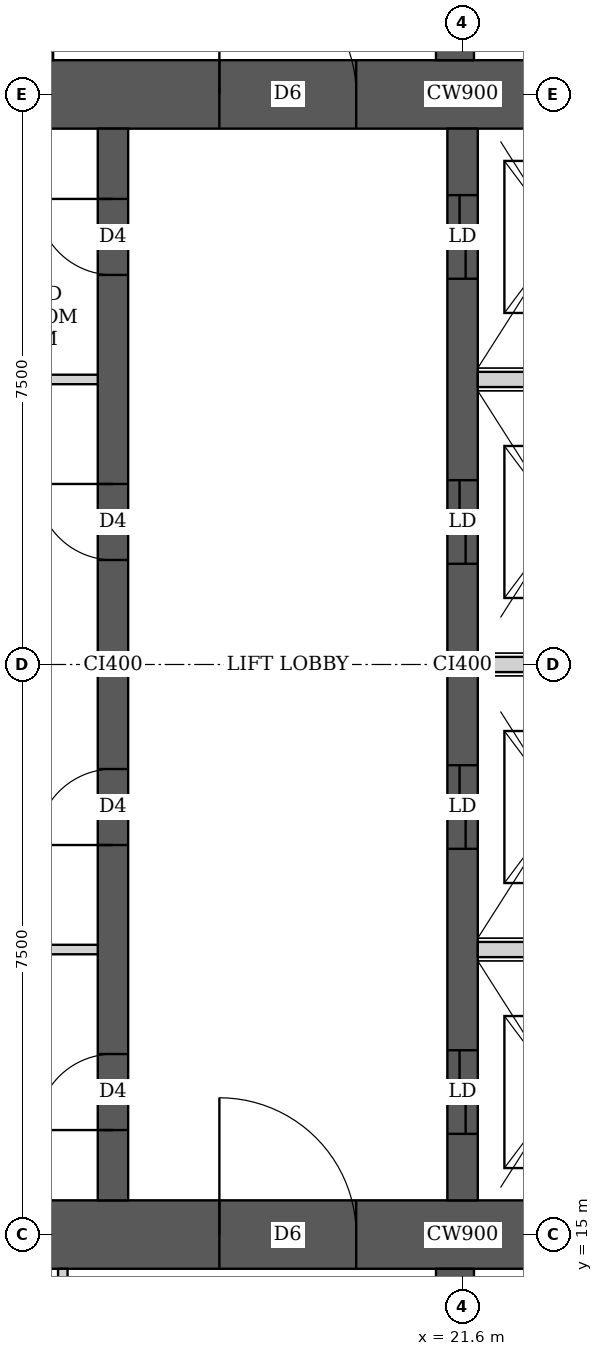
"""IFC4 building model, lengths in metres.
Left out: names, types, materials, properties, quantities, classifications, styles, units other than length and angle.
Written with IfcOpenShell. Run it as: python <this file> out.ifc"""

import sys

from ifc_helpers import new_model, si_unit, direction, frame, frame_2d, origin, place, context, subcontext, project, spatial, rectangle, extrude, element, fill, save


model = new_model("IFC4")
c1 = context("Model", 3, precision=1e-05, world=origin(), true_north=direction((0.0, 1.0)))
c2 = subcontext(c1, "Body", "Model", "MODEL_VIEW")
j1 = project(units=[si_unit("LENGTHUNIT", "METRE"), si_unit("PLANEANGLEUNIT", "RADIAN")], contexts=[c1])
p1 = place(None, origin())
s1 = spatial("IfcSite", under=j1, at=p1, CompositionType="ELEMENT")
p2 = place(p1, origin())
s2 = spatial("IfcBuilding", under=s1, at=p2, CompositionType="ELEMENT")
p3 = place(p2, frame((0.0, 0.0, 212.45)))
s3 = spatial("IfcBuildingStorey", under=s2, at=p3, CompositionType="ELEMENT", Elevation=212.45)
p4 = place(p3, frame((13.95, 15.0, 0.0), z_axis=(0.0, 0.0, 1.0), x_axis=(1.0, 0.0, 0.0)))
e1 = element("IfcWall", 1, at=p4, inside=s3, PredefinedType="SHEAR", context=c2, shape_type="SweptSolid", body=[
    extrude(rectangle(XDim=15.3, YDim=0.9, at=frame_2d((7.65, 0.0))), origin(), (0.0, 0.0, 1.0), 3.75),
])
p5 = place(p4, frame((4.45, 0.0, 0.0)))
e2 = element("IfcOpeningElement", 2, at=p5, cuts=e1, PredefinedType="OPENING", context=c2, shape_type="SweptSolid", body=[
    extrude(rectangle(XDim=1.8, YDim=2.1, at=frame_2d((0.9, 1.05))), frame((0.0, 0.46, 0.0), z_axis=(0.0, -1.0, 0.0), x_axis=(1.0, 0.0, 0.0)), (0.0, 0.0, 1.0), 0.92),
])
p6 = place(p4, frame((10.7, 0.0, 0.0)))
e3 = element("IfcOpeningElement", 3, at=p6, cuts=e1, PredefinedType="OPENING", context=c2, shape_type="SweptSolid", body=[
    extrude(rectangle(XDim=1.1, YDim=2.1, at=frame_2d((0.55, 1.05))), frame((0.0, 0.46, 0.0), z_axis=(0.0, -1.0, 0.0), x_axis=(1.0, 0.0, 0.0)), (0.0, 0.0, 1.0), 0.92),
])
p7 = place(p3, frame((13.95, 30.0, 0.0), z_axis=(0.0, 0.0, 1.0), x_axis=(1.0, 0.0, 0.0)))
e4 = element("IfcWall", 4, at=p7, inside=s3, PredefinedType="SHEAR", context=c2, shape_type="SweptSolid", body=[
    extrude(rectangle(XDim=15.3, YDim=0.9, at=frame_2d((7.65, 0.0))), origin(), (0.0, 0.0, 1.0), 3.75),
])
p8 = place(p7, frame((4.45, 0.0, 0.0)))
e5 = element("IfcOpeningElement", 5, at=p8, cuts=e4, PredefinedType="OPENING", context=c2, shape_type="SweptSolid", body=[
    extrude(rectangle(XDim=1.8, YDim=2.1, at=frame_2d((0.9, 1.05))), frame((0.0, 0.46, 0.0), z_axis=(0.0, -1.0, 0.0), x_axis=(1.0, 0.0, 0.0)), (0.0, 0.0, 1.0), 0.92),
])
p9 = place(p7, frame((10.7, 0.0, 0.0)))
e6 = element("IfcOpeningElement", 6, at=p9, cuts=e4, PredefinedType="OPENING", context=c2, shape_type="SweptSolid", body=[
    extrude(rectangle(XDim=1.1, YDim=2.1, at=frame_2d((0.55, 1.05))), frame((0.0, 0.46, 0.0), z_axis=(0.0, -1.0, 0.0), x_axis=(1.0, 0.0, 0.0)), (0.0, 0.0, 1.0), 0.92),
])
p10 = place(p3, frame((17.0, 15.45, 0.0), z_axis=(0.0, 0.0, 1.0), x_axis=(0.0, 1.0, 0.0)))
e7 = element("IfcWall", 7, at=p10, inside=s3, PredefinedType="SHEAR", context=c2, shape_type="SweptSolid", body=[
    extrude(rectangle(XDim=14.1, YDim=0.4, at=frame_2d((7.05, 0.0))), origin(), (0.0, 0.0, 1.0), 3.75),
])
p11 = place(p10, frame((0.925, 0.0, 0.0)))
e8 = element("IfcOpeningElement", 8, at=p11, cuts=e7, PredefinedType="OPENING", context=c2, shape_type="SweptSolid", body=[
    extrude(rectangle(XDim=1.0, YDim=2.1, at=frame_2d((0.5, 1.05))), frame((0.0, 0.21, 0.0), z_axis=(0.0, -1.0, 0.0), x_axis=(1.0, 0.0, 0.0)), (0.0, 0.0, 1.0), 0.42),
])
p12 = place(p10, frame((4.675, 0.0, 0.0)))
e9 = element("IfcOpeningElement", 9, at=p12, cuts=e7, PredefinedType="OPENING", context=c2, shape_type="SweptSolid", body=[
    extrude(rectangle(XDim=1.0, YDim=2.1, at=frame_2d((0.5, 1.05))), frame((0.0, 0.21, 0.0), z_axis=(0.0, -1.0, 0.0), x_axis=(1.0, 0.0, 0.0)), (0.0, 0.0, 1.0), 0.42),
])
p13 = place(p10, frame((8.425, 0.0, 0.0)))
e10 = element("IfcOpeningElement", 10, at=p13, cuts=e7, PredefinedType="OPENING", context=c2, shape_type="SweptSolid", body=[
    extrude(rectangle(XDim=1.0, YDim=2.1, at=frame_2d((0.5, 1.05))), frame((0.0, 0.21, 0.0), z_axis=(0.0, -1.0, 0.0), x_axis=(1.0, 0.0, 0.0)), (0.0, 0.0, 1.0), 0.42),
])
p14 = place(p10, frame((12.175, 0.0, 0.0)))
e11 = element("IfcOpeningElement", 11, at=p14, cuts=e7, PredefinedType="OPENING", context=c2, shape_type="SweptSolid", body=[
    extrude(rectangle(XDim=1.0, YDim=2.1, at=frame_2d((0.5, 1.05))), frame((0.0, 0.21, 0.0), z_axis=(0.0, -1.0, 0.0), x_axis=(1.0, 0.0, 0.0)), (0.0, 0.0, 1.0), 0.42),
])
p15 = place(p3, frame((21.6, 15.45, 0.0), z_axis=(0.0, 0.0, 1.0), x_axis=(0.0, 1.0, 0.0)))
e12 = element("IfcWall", 12, at=p15, inside=s3, PredefinedType="SHEAR", context=c2, shape_type="SweptSolid", body=[
    extrude(rectangle(XDim=14.1, YDim=0.4, at=frame_2d((7.05, 0.0))), origin(), (0.0, 0.0, 1.0), 3.75),
])
p16 = place(p15, frame((0.875, 0.0, 0.0)))
e13 = element("IfcOpeningElement", 13, at=p16, cuts=e12, PredefinedType="OPENING", context=c2, shape_type="SweptSolid", body=[
    extrude(rectangle(XDim=1.1, YDim=2.1, at=frame_2d((0.55, 1.05))), frame((0.0, 0.21, 0.0), z_axis=(0.0, -1.0, 0.0), x_axis=(1.0, 0.0, 0.0)), (0.0, 0.0, 1.0), 0.42),
])
p17 = place(p15, frame((4.625, 0.0, 0.0)))
e14 = element("IfcOpeningElement", 14, at=p17, cuts=e12, PredefinedType="OPENING", context=c2, shape_type="SweptSolid", body=[
    extrude(rectangle(XDim=1.1, YDim=2.1, at=frame_2d((0.55, 1.05))), frame((0.0, 0.21, 0.0), z_axis=(0.0, -1.0, 0.0), x_axis=(1.0, 0.0, 0.0)), (0.0, 0.0, 1.0), 0.42),
])
p18 = place(p15, frame((8.375, 0.0, 0.0)))
e15 = element("IfcOpeningElement", 15, at=p18, cuts=e12, PredefinedType="OPENING", context=c2, shape_type="SweptSolid", body=[
    extrude(rectangle(XDim=1.1, YDim=2.1, at=frame_2d((0.55, 1.05))), frame((0.0, 0.21, 0.0), z_axis=(0.0, -1.0, 0.0), x_axis=(1.0, 0.0, 0.0)), (0.0, 0.0, 1.0), 0.42),
])
p19 = place(p15, frame((12.125, 0.0, 0.0)))
e16 = element("IfcOpeningElement", 16, at=p19, cuts=e12, PredefinedType="OPENING", context=c2, shape_type="SweptSolid", body=[
    extrude(rectangle(XDim=1.1, YDim=2.1, at=frame_2d((0.55, 1.05))), frame((0.0, 0.21, 0.0), z_axis=(0.0, -1.0, 0.0), x_axis=(1.0, 0.0, 0.0)), (0.0, 0.0, 1.0), 0.42),
])
for number, where, z_axis, x_axis in (
    (17, (21.5, 10.35, 0.0), (0.0, 0.0, 1.0), (0.0, 1.0, 0.0)),
    (18, (21.5, 30.45, 0.0), (0.0, 0.0, 1.0), (0.0, 1.0, 0.0)),
):
    element("IfcWall", number, at=place(p3, frame(where, z_axis=z_axis, x_axis=x_axis)), inside=s3, PredefinedType="SHEAR", context=c2, shape_type="SweptSolid", body=[
        extrude(rectangle(XDim=4.2, YDim=0.5, at=frame_2d((2.1, 0.0))), origin(), (0.0, 0.0, 1.0), 3.75),
    ])
p20 = place(p3, frame((16.34, 10.413, 0.0), z_axis=(0.0, 0.0, 1.0), x_axis=(0.0, 1.0, 0.0)))
e19 = element("IfcWall", 19, at=p20, inside=s3, PredefinedType="PARTITIONING", context=c2, shape_type="SweptSolid", body=[
    extrude(rectangle(XDim=4.137, YDim=0.125, at=frame_2d((2.068, 0.0))), origin(), (0.0, 0.0, 1.0), 3.5),
])
p21 = place(p20, frame((1.512, 0.0, 0.0)))
e20 = element("IfcOpeningElement", 20, at=p21, cuts=e19, PredefinedType="OPENING", context=c2, shape_type="SweptSolid", body=[
    extrude(rectangle(XDim=1.0, YDim=2.1, at=frame_2d((0.5, 1.05))), frame((0.0, 0.073, 0.0), z_axis=(0.0, -1.0, 0.0), x_axis=(1.0, 0.0, 0.0)), (0.0, 0.0, 1.0), 0.145),
])
p22 = place(p3, frame((16.15, 30.45, 0.0), z_axis=(0.0, 0.0, 1.0), x_axis=(0.0, 1.0, 0.0)))
e21 = element("IfcWall", 21, at=p22, inside=s3, PredefinedType="PARTITIONING", context=c2, shape_type="SweptSolid", body=[
    extrude(rectangle(XDim=4.137, YDim=0.125, at=frame_2d((2.068, 0.0))), origin(), (0.0, 0.0, 1.0), 3.5),
])
p23 = place(p22, frame((1.625, 0.0, 0.0)))
e22 = element("IfcOpeningElement", 22, at=p23, cuts=e21, PredefinedType="OPENING", context=c2, shape_type="SweptSolid", body=[
    extrude(rectangle(XDim=1.0, YDim=2.1, at=frame_2d((0.5, 1.05))), frame((0.0, 0.073, 0.0), z_axis=(0.0, -1.0, 0.0), x_axis=(1.0, 0.0, 0.0)), (0.0, 0.0, 1.0), 0.145),
])
for number, where, z_axis, x_axis in (
    (23, (14.85, 18.75, 0.0), (0.0, 0.0, 1.0), (1.0, 0.0, 0.0)),
    (24, (14.85, 26.25, 0.0), (0.0, 0.0, 1.0), (1.0, 0.0, 0.0)),
):
    element("IfcWall", number, at=place(p3, frame(where, z_axis=z_axis, x_axis=x_axis)), inside=s3, PredefinedType="PARTITIONING", context=c2, shape_type="SweptSolid", body=[
        extrude(rectangle(XDim=1.95, YDim=0.125, at=frame_2d((0.975, 0.0))), origin(), (0.0, 0.0, 1.0), 3.5),
    ])
for number, where, z_axis, x_axis in (
    (25, (21.8, 18.75, 0.0), (0.0, 0.0, 1.0), (1.0, 0.0, 0.0)),
    (26, (21.8, 22.5, 0.0), (0.0, 0.0, 1.0), (1.0, 0.0, 0.0)),
    (27, (21.8, 26.25, 0.0), (0.0, 0.0, 1.0), (1.0, 0.0, 0.0)),
):
    element("IfcWall", number, at=place(p3, frame(where, z_axis=z_axis, x_axis=x_axis)), inside=s3, PredefinedType="SOLIDWALL", context=c2, shape_type="SweptSolid", body=[
        extrude(rectangle(XDim=2.2, YDim=0.2, at=frame_2d((1.1, 0.0))), origin(), (0.0, 0.0, 1.0), 3.5),
    ])
p24 = place(p11, origin())
e28 = element("IfcDoor", 28, at=p24, inside=s3, OperationType="SINGLE_SWING_LEFT", PredefinedType="DOOR", context=c2, shape_type="SweptSolid", body=[
    extrude(rectangle(XDim=1.0, YDim=2.1, at=frame_2d((0.5, 1.05))), frame((0.0, 0.025, 0.0), z_axis=(0.0, -1.0, 0.0), x_axis=(1.0, 0.0, 0.0)), (0.0, 0.0, 1.0), 0.05),
])
fill(e8, e28)
p25 = place(p12, origin())
e29 = element("IfcDoor", 29, at=p25, inside=s3, OperationType="SINGLE_SWING_LEFT", PredefinedType="DOOR", context=c2, shape_type="SweptSolid", body=[
    extrude(rectangle(XDim=1.0, YDim=2.1, at=frame_2d((0.5, 1.05))), frame((0.0, 0.025, 0.0), z_axis=(0.0, -1.0, 0.0), x_axis=(1.0, 0.0, 0.0)), (0.0, 0.0, 1.0), 0.05),
])
fill(e9, e29)
p26 = place(p13, origin())
e30 = element("IfcDoor", 30, at=p26, inside=s3, OperationType="SINGLE_SWING_RIGHT", PredefinedType="DOOR", context=c2, shape_type="SweptSolid", body=[
    extrude(rectangle(XDim=1.0, YDim=2.1, at=frame_2d((0.5, 1.05))), frame((0.0, 0.025, 0.0), z_axis=(0.0, -1.0, 0.0), x_axis=(1.0, 0.0, 0.0)), (0.0, 0.0, 1.0), 0.05),
])
fill(e10, e30)
p27 = place(p14, origin())
e31 = element("IfcDoor", 31, at=p27, inside=s3, OperationType="SINGLE_SWING_RIGHT", PredefinedType="DOOR", context=c2, shape_type="SweptSolid", body=[
    extrude(rectangle(XDim=1.0, YDim=2.1, at=frame_2d((0.5, 1.05))), frame((0.0, 0.025, 0.0), z_axis=(0.0, -1.0, 0.0), x_axis=(1.0, 0.0, 0.0)), (0.0, 0.0, 1.0), 0.05),
])
fill(e11, e31)
p28 = place(p5, origin())
e32 = element("IfcDoor", 32, at=p28, inside=s3, OperationType="DOUBLE_DOOR_SINGLE_SWING", PredefinedType="DOOR", context=c2, shape_type="SweptSolid", body=[
    extrude(rectangle(XDim=1.8, YDim=2.1, at=frame_2d((0.9, 1.05))), frame((0.0, 0.025, 0.0), z_axis=(0.0, -1.0, 0.0), x_axis=(1.0, 0.0, 0.0)), (0.0, 0.0, 1.0), 0.05),
])
fill(e2, e32)
p29 = place(p8, origin())
e33 = element("IfcDoor", 33, at=p29, inside=s3, OperationType="DOUBLE_DOOR_SINGLE_SWING", PredefinedType="DOOR", context=c2, shape_type="SweptSolid", body=[
    extrude(rectangle(XDim=1.8, YDim=2.1, at=frame_2d((0.9, 1.05))), frame((0.0, 0.025, 0.0), z_axis=(0.0, -1.0, 0.0), x_axis=(1.0, 0.0, 0.0)), (0.0, 0.0, 1.0), 0.05),
])
fill(e5, e33)
p30 = place(p16, origin())
e34 = element("IfcDoor", 34, at=p30, inside=s3, OperationType="DOUBLE_DOOR_SLIDING", PredefinedType="DOOR", context=c2, shape_type="SweptSolid", body=[
    extrude(rectangle(XDim=1.1, YDim=2.1, at=frame_2d((0.55, 1.05))), frame((0.0, 0.025, 0.0), z_axis=(0.0, -1.0, 0.0), x_axis=(1.0, 0.0, 0.0)), (0.0, 0.0, 1.0), 0.05),
])
fill(e13, e34)
p31 = place(p17, origin())
e35 = element("IfcDoor", 35, at=p31, inside=s3, OperationType="DOUBLE_DOOR_SLIDING", PredefinedType="DOOR", context=c2, shape_type="SweptSolid", body=[
    extrude(rectangle(XDim=1.1, YDim=2.1, at=frame_2d((0.55, 1.05))), frame((0.0, 0.025, 0.0), z_axis=(0.0, -1.0, 0.0), x_axis=(1.0, 0.0, 0.0)), (0.0, 0.0, 1.0), 0.05),
])
fill(e14, e35)
p32 = place(p18, origin())
e36 = element("IfcDoor", 36, at=p32, inside=s3, OperationType="DOUBLE_DOOR_SLIDING", PredefinedType="DOOR", context=c2, shape_type="SweptSolid", body=[
    extrude(rectangle(XDim=1.1, YDim=2.1, at=frame_2d((0.55, 1.05))), frame((0.0, 0.025, 0.0), z_axis=(0.0, -1.0, 0.0), x_axis=(1.0, 0.0, 0.0)), (0.0, 0.0, 1.0), 0.05),
])
fill(e15, e36)
p33 = place(p19, origin())
e37 = element("IfcDoor", 37, at=p33, inside=s3, OperationType="DOUBLE_DOOR_SLIDING", PredefinedType="DOOR", context=c2, shape_type="SweptSolid", body=[
    extrude(rectangle(XDim=1.1, YDim=2.1, at=frame_2d((0.55, 1.05))), frame((0.0, 0.025, 0.0), z_axis=(0.0, -1.0, 0.0), x_axis=(1.0, 0.0, 0.0)), (0.0, 0.0, 1.0), 0.05),
])
fill(e16, e37)
save(model, sys.argv[1])
